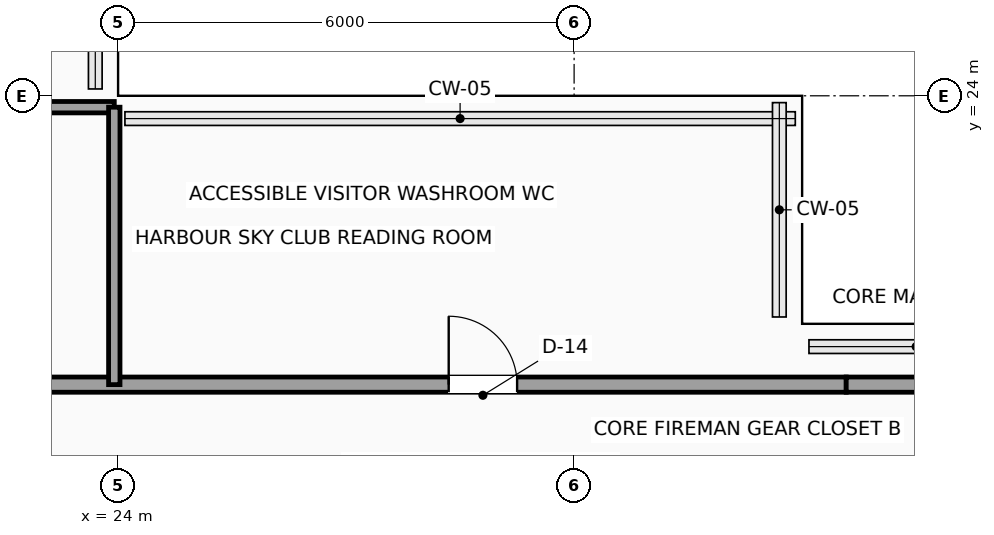
"""IFC4 building model, lengths in metres.
Left out: names, types, materials, properties, quantities, classifications, styles, units other than length and angle.
Written with IfcOpenShell. Run it as: python <this file> out.ifc"""

import sys

from ifc_helpers import new_model, si_unit, direction, frame, frame_2d, origin, place, context, subcontext, project, spatial, rectangle, extrude, element, fill, save


model = new_model("IFC4")
c1 = context("Model", 3, precision=1e-05, world=origin(), true_north=direction((0.0, 1.0)))
c2 = subcontext(c1, "Body", "Model", "MODEL_VIEW")
j1 = project(units=[si_unit("LENGTHUNIT", "METRE"), si_unit("PLANEANGLEUNIT", "RADIAN")], contexts=[c1])
p1 = place(None, origin())
s1 = spatial("IfcSite", under=j1, at=p1, CompositionType="ELEMENT")
p2 = place(p1, origin())
s2 = spatial("IfcBuilding", under=s1, at=p2, CompositionType="ELEMENT")
p3 = place(p2, frame((0.0, 0.0, 253.7)))
s3 = spatial("IfcBuildingStorey", under=s2, at=p3, CompositionType="ELEMENT", Elevation=253.7)
p4 = place(p3, frame((20.45, 20.2, 0.0), z_axis=(0.0, 0.0, 1.0), x_axis=(1.0, 0.0, 0.0)))
e1 = element("IfcWall", 1, at=p4, inside=s3, PredefinedType="SOLIDWALL", context=c2, shape_type="SweptSolid", body=[
    extrude(rectangle(XDim=13.13, YDim=0.2, at=frame_2d((6.565, 0.0))), origin(), (0.0, 0.0, 1.0), 3.3),
])
p5 = place(p4, frame((7.9, 0.0, 0.0)))
e2 = element("IfcOpeningElement", 2, at=p5, cuts=e1, PredefinedType="OPENING", context=c2, shape_type="SweptSolid", body=[
    extrude(rectangle(XDim=0.9, YDim=2.1, at=frame_2d((0.45, 1.05))), frame((0.0, 0.11, 0.0), z_axis=(0.0, -1.0, 0.0), x_axis=(1.0, 0.0, 0.0)), (0.0, 0.0, 1.0), 0.22),
])
p6 = place(p3, frame((33.58, 20.2, 0.0), z_axis=(0.0, 0.0, 1.0), x_axis=(1.0, 0.0, 0.0)))
e3 = element("IfcWall", 3, at=p6, inside=s3, PredefinedType="SOLIDWALL", context=c2, shape_type="SweptSolid", body=[
    extrude(rectangle(XDim=2.12, YDim=0.2, at=frame_2d((1.06, 0.0))), origin(), (0.0, 0.0, 1.0), 3.3),
])
p7 = place(p3, frame((20.45, 23.85, 0.0), z_axis=(0.0, 0.0, 1.0), x_axis=(1.0, 0.0, 0.0)))
e4 = element("IfcWall", 4, at=p7, inside=s3, PredefinedType="PARTITIONING", context=c2, shape_type="SweptSolid", body=[
    extrude(rectangle(XDim=3.5, YDim=0.15, at=frame_2d((1.75, 0.0))), origin(), (0.0, 0.0, 1.0), 3.3),
])
p8 = place(p3, frame((23.95, 20.2, 0.0), z_axis=(0.0, 0.0, 1.0), x_axis=(0.0, 1.0, 0.0)))
e5 = element("IfcWall", 5, at=p8, inside=s3, PredefinedType="PARTITIONING", context=c2, shape_type="SweptSolid", body=[
    extrude(rectangle(XDim=3.65, YDim=0.15, at=frame_2d((1.825, 0.0))), origin(), (0.0, 0.0, 1.0), 3.3),
])
p9 = place(p5, origin())
e6 = element("IfcDoor", 6, at=p9, inside=s3, OperationType="SINGLE_SWING_LEFT", PredefinedType="DOOR", context=c2, shape_type="SweptSolid", body=[
    extrude(rectangle(XDim=0.9, YDim=2.1, at=frame_2d((0.45, 1.05))), frame((0.0, 0.025, 0.0), z_axis=(0.0, -1.0, 0.0), x_axis=(1.0, 0.0, 0.0)), (0.0, 0.0, 1.0), 0.05),
])
fill(e2, e6)
save(model, sys.argv[1])
